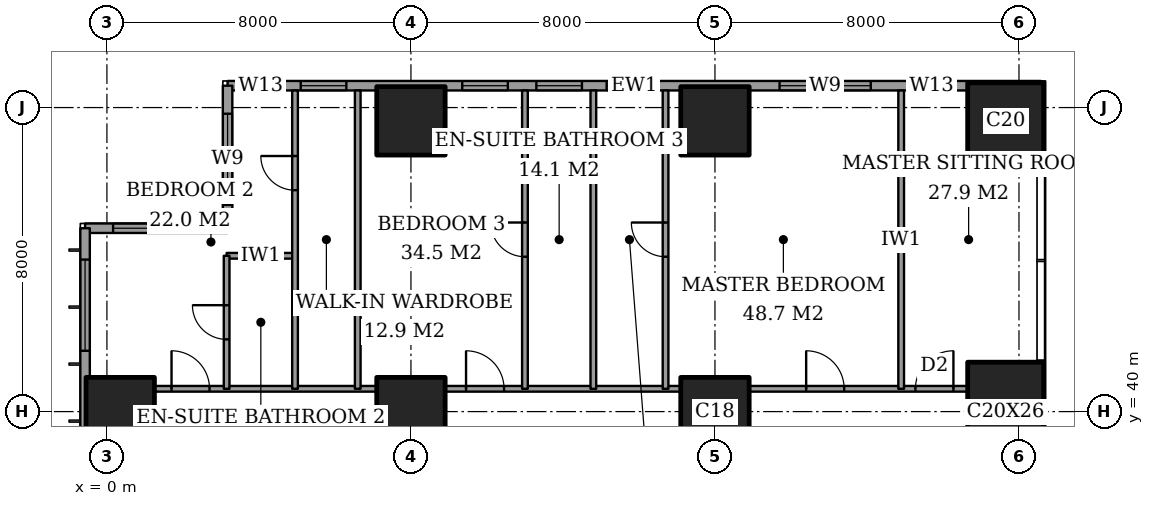
"""IFC4 building model, lengths in metres.
Left out: names, types, materials, properties, quantities, classifications, styles, units other than length and angle.
Written with IfcOpenShell. Run it as: python <this file> out.ifc"""

import sys

from ifc_helpers import new_model, si_unit, direction, frame, frame_2d, origin, origin_2d, place, context, subcontext, project, spatial, rectangle, extrude, element, fill, save


model = new_model("IFC4")
c1 = context("Model", 3, precision=1e-05, world=origin(), true_north=direction((0.0, 1.0)))
c2 = subcontext(c1, "Body", "Model", "MODEL_VIEW")
j1 = project(units=[si_unit("LENGTHUNIT", "METRE"), si_unit("PLANEANGLEUNIT", "RADIAN")], contexts=[c1])
p1 = place(None, origin())
s1 = spatial("IfcSite", under=j1, at=p1, CompositionType="ELEMENT")
p2 = place(p1, origin())
s2 = spatial("IfcBuilding", under=s1, at=p2, CompositionType="ELEMENT")
p3 = place(p2, frame((0.0, 0.0, 214.6)))
s3 = spatial("IfcBuildingStorey", under=s2, at=p3, CompositionType="ELEMENT", Elevation=214.6)
for number, where, z_axis, x_axis in (
    (1, (0.35, 40.0, 0.0), (0.0, 0.0, 1.0), (1.0, 0.0, 0.0)),
    (2, (8.0, 40.0, 0.0), (0.0, 0.0, 1.0), (1.0, 0.0, 0.0)),
    (3, (8.0, 47.65, 0.0), (0.0, 0.0, 1.0), (1.0, 0.0, 0.0)),
    (4, (16.0, 40.0, 0.0), (0.0, 0.0, 1.0), (1.0, 0.0, 0.0)),
    (5, (16.0, 47.65, 0.0), (0.0, 0.0, 1.0), (1.0, 0.0, 0.0)),
):
    element("IfcColumn", number, at=place(p3, frame(where, z_axis=z_axis, x_axis=x_axis)), inside=s3, PredefinedType="COLUMN", context=c2, shape_type="SweptSolid", body=[
        extrude(rectangle(XDim=1.8, YDim=1.8, at=origin_2d()), origin(), (0.0, 0.0, 1.0), 3.6),
    ])
p4 = place(p3, frame((23.65, 40.0, 0.0), z_axis=(0.0, 0.0, 1.0), x_axis=(1.0, 0.0, 0.0)))
e6 = element("IfcColumn", 6, at=p4, inside=s3, PredefinedType="COLUMN", context=c2, shape_type="SweptSolid", body=[
    extrude(rectangle(XDim=2.0, YDim=2.6, at=origin_2d()), origin(), (0.0, 0.0, 1.0), 3.6),
])
p5 = place(p3, frame((23.65, 47.65, 0.0), z_axis=(0.0, 0.0, 1.0), x_axis=(1.0, 0.0, 0.0)))
e7 = element("IfcColumn", 7, at=p5, inside=s3, PredefinedType="COLUMN", context=c2, shape_type="SweptSolid", body=[
    extrude(rectangle(XDim=2.0, YDim=2.0, at=origin_2d()), origin(), (0.0, 0.0, 1.0), 3.6),
])
p6 = place(p3, frame((24.575, 48.575, 0.0), z_axis=(0.0, 0.0, 1.0), x_axis=(-1.0, 0.0, 0.0)))
e8 = element("IfcWall", 8, at=p6, inside=s3, PredefinedType="SOLIDWALL", context=c2, shape_type="SweptSolid", body=[
    extrude(rectangle(XDim=21.4, YDim=0.25, at=frame_2d((10.7, 0.0))), origin(), (0.0, 0.0, 1.0), 3.6),
])
p7 = place(p6, frame((2.275, 0.0, 0.2)))
e9 = element("IfcOpeningElement", 9, at=p7, cuts=e8, PredefinedType="OPENING", context=c2, shape_type="SweptSolid", body=[
    extrude(rectangle(XDim=1.2, YDim=2.4, at=frame_2d((0.6, 1.2))), frame((0.0, 0.135, 0.0), z_axis=(0.0, -1.0, 0.0), x_axis=(1.0, 0.0, 0.0)), (0.0, 0.0, 1.0), 0.27),
])
p8 = place(p6, frame((4.475, 0.0, 0.2)))
e10 = element("IfcOpeningElement", 10, at=p8, cuts=e8, PredefinedType="OPENING", context=c2, shape_type="SweptSolid", body=[
    extrude(rectangle(XDim=2.4, YDim=2.4, at=frame_2d((1.2, 1.2))), frame((0.0, 0.135, 0.0), z_axis=(0.0, -1.0, 0.0), x_axis=(1.0, 0.0, 0.0)), (0.0, 0.0, 1.0), 0.27),
])
p9 = place(p6, frame((10.225, 0.0, 0.2)))
e11 = element("IfcOpeningElement", 11, at=p9, cuts=e8, PredefinedType="OPENING", context=c2, shape_type="SweptSolid", body=[
    extrude(rectangle(XDim=1.2, YDim=2.4, at=frame_2d((0.6, 1.2))), frame((0.0, 0.135, 0.0), z_axis=(0.0, -1.0, 0.0), x_axis=(1.0, 0.0, 0.0)), (0.0, 0.0, 1.0), 0.27),
])
p10 = place(p6, frame((12.075, 0.0, 0.2)))
e12 = element("IfcOpeningElement", 12, at=p10, cuts=e8, PredefinedType="OPENING", context=c2, shape_type="SweptSolid", body=[
    extrude(rectangle(XDim=1.2, YDim=2.4, at=frame_2d((0.6, 1.2))), frame((0.0, 0.135, 0.0), z_axis=(0.0, -1.0, 0.0), x_axis=(1.0, 0.0, 0.0)), (0.0, 0.0, 1.0), 0.27),
])
p11 = place(p6, frame((14.025, 0.0, 0.2)))
e13 = element("IfcOpeningElement", 13, at=p11, cuts=e8, PredefinedType="OPENING", context=c2, shape_type="SweptSolid", body=[
    extrude(rectangle(XDim=1.2, YDim=2.4, at=frame_2d((0.6, 1.2))), frame((0.0, 0.135, 0.0), z_axis=(0.0, -1.0, 0.0), x_axis=(1.0, 0.0, 0.0)), (0.0, 0.0, 1.0), 0.27),
])
p12 = place(p6, frame((18.275, 0.0, 0.2)))
e14 = element("IfcOpeningElement", 14, at=p12, cuts=e8, PredefinedType="OPENING", context=c2, shape_type="SweptSolid", body=[
    extrude(rectangle(XDim=1.2, YDim=2.4, at=frame_2d((0.6, 1.2))), frame((0.0, 0.135, 0.0), z_axis=(0.0, -1.0, 0.0), x_axis=(1.0, 0.0, 0.0)), (0.0, 0.0, 1.0), 0.27),
])
p13 = place(p6, frame((19.925, 0.0, 0.2)))
e15 = element("IfcOpeningElement", 15, at=p13, cuts=e8, PredefinedType="OPENING", context=c2, shape_type="SweptSolid", body=[
    extrude(rectangle(XDim=1.2, YDim=2.4, at=frame_2d((0.6, 1.2))), frame((0.0, 0.135, 0.0), z_axis=(0.0, -1.0, 0.0), x_axis=(1.0, 0.0, 0.0)), (0.0, 0.0, 1.0), 0.27),
])
p14 = place(p3, frame((3.175, 48.575, 0.0), z_axis=(0.0, 0.0, 1.0), x_axis=(0.0, -1.0, 0.0)))
e16 = element("IfcWall", 16, at=p14, inside=s3, PredefinedType="SOLIDWALL", context=c2, shape_type="SweptSolid", body=[
    extrude(rectangle(XDim=3.75, YDim=0.25, at=frame_2d((1.875, 0.0))), origin(), (0.0, 0.0, 1.0), 3.6),
])
p15 = place(p14, frame((0.738, 0.0, 0.2)))
e17 = element("IfcOpeningElement", 17, at=p15, cuts=e16, PredefinedType="OPENING", context=c2, shape_type="SweptSolid", body=[
    extrude(rectangle(XDim=2.4, YDim=2.4, at=frame_2d((1.2, 1.2))), frame((0.0, 0.135, 0.0), z_axis=(0.0, -1.0, 0.0), x_axis=(1.0, 0.0, 0.0)), (0.0, 0.0, 1.0), 0.27),
])
p16 = place(p3, frame((3.175, 44.825, 0.0), z_axis=(0.0, 0.0, 1.0), x_axis=(-1.0, 0.0, 0.0)))
e18 = element("IfcWall", 18, at=p16, inside=s3, PredefinedType="SOLIDWALL", context=c2, shape_type="SweptSolid", body=[
    extrude(rectangle(XDim=3.75, YDim=0.25, at=frame_2d((1.875, 0.0))), origin(), (0.0, 0.0, 1.0), 3.6),
])
p17 = place(p16, frame((0.613, 0.0, 0.2)))
e19 = element("IfcOpeningElement", 19, at=p17, cuts=e18, PredefinedType="OPENING", context=c2, shape_type="SweptSolid", body=[
    extrude(rectangle(XDim=2.4, YDim=2.4, at=frame_2d((1.2, 1.2))), frame((0.0, 0.135, 0.0), z_axis=(0.0, -1.0, 0.0), x_axis=(1.0, 0.0, 0.0)), (0.0, 0.0, 1.0), 0.27),
])
p18 = place(p3, frame((-0.575, 44.825, 0.0), z_axis=(0.0, 0.0, 1.0), x_axis=(0.0, -1.0, 0.0)))
e20 = element("IfcWall", 20, at=p18, inside=s3, PredefinedType="SOLIDWALL", context=c2, shape_type="SweptSolid", body=[
    extrude(rectangle(XDim=41.65, YDim=0.25, at=frame_2d((20.825, 0.0))), origin(), (0.0, 0.0, 1.0), 3.6),
])
p19 = place(p18, frame((0.825, 0.0, 0.2)))
e21 = element("IfcOpeningElement", 21, at=p19, cuts=e20, PredefinedType="OPENING", context=c2, shape_type="SweptSolid", body=[
    extrude(rectangle(XDim=2.4, YDim=2.4, at=frame_2d((1.2, 1.2))), frame((0.0, 0.135, 0.0), z_axis=(0.0, -1.0, 0.0), x_axis=(1.0, 0.0, 0.0)), (0.0, 0.0, 1.0), 0.27),
])
p20 = place(p18, frame((6.05, 0.0, 0.2)))
e22 = element("IfcOpeningElement", 22, at=p20, cuts=e20, PredefinedType="OPENING", context=c2, shape_type="SweptSolid", body=[
    extrude(rectangle(XDim=1.2, YDim=2.4, at=frame_2d((0.6, 1.2))), frame((0.0, 0.135, 0.0), z_axis=(0.0, -1.0, 0.0), x_axis=(1.0, 0.0, 0.0)), (0.0, 0.0, 1.0), 0.27),
])
p21 = place(p18, frame((8.225, 0.0, 0.2)))
e23 = element("IfcOpeningElement", 23, at=p21, cuts=e20, PredefinedType="OPENING", context=c2, shape_type="SweptSolid", body=[
    extrude(rectangle(XDim=2.4, YDim=2.4, at=frame_2d((1.2, 1.2))), frame((0.0, 0.135, 0.0), z_axis=(0.0, -1.0, 0.0), x_axis=(1.0, 0.0, 0.0)), (0.0, 0.0, 1.0), 0.27),
])
p22 = place(p18, frame((15.625, 0.0, 0.2)))
e24 = element("IfcOpeningElement", 24, at=p22, cuts=e20, PredefinedType="OPENING", context=c2, shape_type="SweptSolid", body=[
    extrude(rectangle(XDim=2.4, YDim=2.4, at=frame_2d((1.2, 1.2))), frame((0.0, 0.135, 0.0), z_axis=(0.0, -1.0, 0.0), x_axis=(1.0, 0.0, 0.0)), (0.0, 0.0, 1.0), 0.27),
])
p23 = place(p18, frame((23.625, 0.0, 0.2)))
e25 = element("IfcOpeningElement", 25, at=p23, cuts=e20, PredefinedType="OPENING", context=c2, shape_type="SweptSolid", body=[
    extrude(rectangle(XDim=2.4, YDim=2.4, at=frame_2d((1.2, 1.2))), frame((0.0, 0.135, 0.0), z_axis=(0.0, -1.0, 0.0), x_axis=(1.0, 0.0, 0.0)), (0.0, 0.0, 1.0), 0.27),
])
p24 = place(p18, frame((30.775, 0.0, 0.2)))
e26 = element("IfcOpeningElement", 26, at=p24, cuts=e20, PredefinedType="OPENING", context=c2, shape_type="SweptSolid", body=[
    extrude(rectangle(XDim=2.4, YDim=2.4, at=frame_2d((1.2, 1.2))), frame((0.0, 0.135, 0.0), z_axis=(0.0, -1.0, 0.0), x_axis=(1.0, 0.0, 0.0)), (0.0, 0.0, 1.0), 0.27),
])
p25 = place(p18, frame((34.55, 0.0, 0.2)))
e27 = element("IfcOpeningElement", 27, at=p25, cuts=e20, PredefinedType="OPENING", context=c2, shape_type="SweptSolid", body=[
    extrude(rectangle(XDim=1.2, YDim=2.4, at=frame_2d((0.6, 1.2))), frame((0.0, 0.135, 0.0), z_axis=(0.0, -1.0, 0.0), x_axis=(1.0, 0.0, 0.0)), (0.0, 0.0, 1.0), 0.27),
])
p26 = place(p18, frame((38.425, 0.0, 0.2)))
e28 = element("IfcOpeningElement", 28, at=p26, cuts=e20, PredefinedType="OPENING", context=c2, shape_type="SweptSolid", body=[
    extrude(rectangle(XDim=2.4, YDim=2.4, at=frame_2d((1.2, 1.2))), frame((0.0, 0.135, 0.0), z_axis=(0.0, -1.0, 0.0), x_axis=(1.0, 0.0, 0.0)), (0.0, 0.0, 1.0), 0.27),
])
p27 = place(p3, frame((1.25, 40.6, 0.0), z_axis=(0.0, 0.0, 1.0), x_axis=(1.0, 0.0, 0.0)))
e29 = element("IfcWall", 29, at=p27, inside=s3, PredefinedType="PARTITIONING", context=c2, shape_type="SweptSolid", body=[
    extrude(rectangle(XDim=5.85, YDim=0.15, at=frame_2d((2.925, 0.0))), origin(), (0.0, 0.0, 1.0), 3.35),
])
p28 = place(p27, frame((0.45, 0.0, 0.0)))
e30 = element("IfcOpeningElement", 30, at=p28, cuts=e29, PredefinedType="OPENING", context=c2, shape_type="SweptSolid", body=[
    extrude(rectangle(XDim=1.0, YDim=2.1, at=frame_2d((0.5, 1.05))), frame((0.0, 0.085, 0.0), z_axis=(0.0, -1.0, 0.0), x_axis=(1.0, 0.0, 0.0)), (0.0, 0.0, 1.0), 0.17),
])
p29 = place(p3, frame((8.9, 40.6, 0.0), z_axis=(0.0, 0.0, 1.0), x_axis=(1.0, 0.0, 0.0)))
e31 = element("IfcWall", 31, at=p29, inside=s3, PredefinedType="PARTITIONING", context=c2, shape_type="SweptSolid", body=[
    extrude(rectangle(XDim=6.2, YDim=0.15, at=frame_2d((3.1, 0.0))), origin(), (0.0, 0.0, 1.0), 3.35),
])
p30 = place(p29, frame((0.55, 0.0, 0.0)))
e32 = element("IfcOpeningElement", 32, at=p30, cuts=e31, PredefinedType="OPENING", context=c2, shape_type="SweptSolid", body=[
    extrude(rectangle(XDim=1.0, YDim=2.1, at=frame_2d((0.5, 1.05))), frame((0.0, 0.085, 0.0), z_axis=(0.0, -1.0, 0.0), x_axis=(1.0, 0.0, 0.0)), (0.0, 0.0, 1.0), 0.17),
])
p31 = place(p3, frame((16.9, 40.6, 0.0), z_axis=(0.0, 0.0, 1.0), x_axis=(1.0, 0.0, 0.0)))
e33 = element("IfcWall", 33, at=p31, inside=s3, PredefinedType="PARTITIONING", context=c2, shape_type="SweptSolid", body=[
    extrude(rectangle(XDim=5.75, YDim=0.15, at=frame_2d((2.875, 0.0))), origin(), (0.0, 0.0, 1.0), 3.35),
])
p32 = place(p31, frame((1.5, 0.0, 0.0)))
e34 = element("IfcOpeningElement", 34, at=p32, cuts=e33, PredefinedType="OPENING", context=c2, shape_type="SweptSolid", body=[
    extrude(rectangle(XDim=1.0, YDim=2.1, at=frame_2d((0.5, 1.05))), frame((0.0, 0.085, 0.0), z_axis=(0.0, -1.0, 0.0), x_axis=(1.0, 0.0, 0.0)), (0.0, 0.0, 1.0), 0.17),
])
p33 = place(p31, frame((4.375, 0.0, 0.0)))
e35 = element("IfcOpeningElement", 35, at=p33, cuts=e33, PredefinedType="OPENING", context=c2, shape_type="SweptSolid", body=[
    extrude(rectangle(XDim=1.0, YDim=2.1, at=frame_2d((0.5, 1.05))), frame((0.0, 0.085, 0.0), z_axis=(0.0, -1.0, 0.0), x_axis=(1.0, 0.0, 0.0)), (0.0, 0.0, 1.0), 0.17),
])
p34 = place(p3, frame((3.15, 44.1, 0.0), z_axis=(0.0, 0.0, 1.0), x_axis=(1.0, 0.0, 0.0)))
e36 = element("IfcWall", 36, at=p34, inside=s3, PredefinedType="PARTITIONING", context=c2, shape_type="SweptSolid", body=[
    extrude(rectangle(XDim=1.8, YDim=0.15, at=frame_2d((0.9, 0.0))), origin(), (0.0, 0.0, 1.0), 3.35),
])
p35 = place(p3, frame((3.15, 40.6, 0.0), z_axis=(0.0, 0.0, 1.0), x_axis=(0.0, 1.0, 0.0)))
e37 = element("IfcWall", 37, at=p35, inside=s3, PredefinedType="PARTITIONING", context=c2, shape_type="SweptSolid", body=[
    extrude(rectangle(XDim=3.5, YDim=0.15, at=frame_2d((1.75, 0.0))), origin(), (0.0, 0.0, 1.0), 3.35),
])
p36 = place(p35, frame((1.3, 0.0, 0.0)))
e38 = element("IfcOpeningElement", 38, at=p36, cuts=e37, PredefinedType="OPENING", context=c2, shape_type="SweptSolid", body=[
    extrude(rectangle(XDim=0.9, YDim=2.1, at=frame_2d((0.45, 1.05))), frame((0.0, 0.085, 0.0), z_axis=(0.0, -1.0, 0.0), x_axis=(1.0, 0.0, 0.0)), (0.0, 0.0, 1.0), 0.17),
])
p37 = place(p3, frame((4.95, 40.6, 0.0), z_axis=(0.0, 0.0, 1.0), x_axis=(0.0, 1.0, 0.0)))
e39 = element("IfcWall", 39, at=p37, inside=s3, PredefinedType="PARTITIONING", context=c2, shape_type="SweptSolid", body=[
    extrude(rectangle(XDim=7.85, YDim=0.15, at=frame_2d((3.925, 0.0))), origin(), (0.0, 0.0, 1.0), 3.35),
])
p38 = place(p37, frame((5.225, 0.0, 0.0)))
e40 = element("IfcOpeningElement", 40, at=p38, cuts=e39, PredefinedType="OPENING", context=c2, shape_type="SweptSolid", body=[
    extrude(rectangle(XDim=0.9, YDim=2.1, at=frame_2d((0.45, 1.05))), frame((0.0, 0.085, 0.0), z_axis=(0.0, -1.0, 0.0), x_axis=(1.0, 0.0, 0.0)), (0.0, 0.0, 1.0), 0.17),
])
p39 = place(p3, frame((6.6, 40.6, 0.0), z_axis=(0.0, 0.0, 1.0), x_axis=(0.0, 1.0, 0.0)))
e41 = element("IfcWall", 41, at=p39, inside=s3, PredefinedType="PARTITIONING", context=c2, shape_type="SweptSolid", body=[
    extrude(rectangle(XDim=7.85, YDim=0.15, at=frame_2d((3.925, 0.0))), origin(), (0.0, 0.0, 1.0), 3.35),
])
p40 = place(p3, frame((11.0, 40.6, 0.0), z_axis=(0.0, 0.0, 1.0), x_axis=(0.0, 1.0, 0.0)))
e42 = element("IfcWall", 42, at=p40, inside=s3, PredefinedType="PARTITIONING", context=c2, shape_type="SweptSolid", body=[
    extrude(rectangle(XDim=7.85, YDim=0.15, at=frame_2d((3.925, 0.0))), origin(), (0.0, 0.0, 1.0), 3.35),
])
p41 = place(p40, frame((3.475, 0.0, 0.0)))
e43 = element("IfcOpeningElement", 43, at=p41, cuts=e42, PredefinedType="OPENING", context=c2, shape_type="SweptSolid", body=[
    extrude(rectangle(XDim=0.9, YDim=2.1, at=frame_2d((0.45, 1.05))), frame((0.0, 0.085, 0.0), z_axis=(0.0, -1.0, 0.0), x_axis=(1.0, 0.0, 0.0)), (0.0, 0.0, 1.0), 0.17),
])
p42 = place(p3, frame((12.8, 40.6, 0.0), z_axis=(0.0, 0.0, 1.0), x_axis=(0.0, 1.0, 0.0)))
e44 = element("IfcWall", 44, at=p42, inside=s3, PredefinedType="PARTITIONING", context=c2, shape_type="SweptSolid", body=[
    extrude(rectangle(XDim=7.85, YDim=0.15, at=frame_2d((3.925, 0.0))), origin(), (0.0, 0.0, 1.0), 3.35),
])
p43 = place(p3, frame((14.7, 40.6, 0.0), z_axis=(0.0, 0.0, 1.0), x_axis=(0.0, 1.0, 0.0)))
e45 = element("IfcWall", 45, at=p43, inside=s3, PredefinedType="PARTITIONING", context=c2, shape_type="SweptSolid", body=[
    extrude(rectangle(XDim=7.85, YDim=0.15, at=frame_2d((3.925, 0.0))), origin(), (0.0, 0.0, 1.0), 3.35),
])
p44 = place(p43, frame((3.475, 0.0, 0.0)))
e46 = element("IfcOpeningElement", 46, at=p44, cuts=e45, PredefinedType="OPENING", context=c2, shape_type="SweptSolid", body=[
    extrude(rectangle(XDim=0.9, YDim=2.1, at=frame_2d((0.45, 1.05))), frame((0.0, 0.085, 0.0), z_axis=(0.0, -1.0, 0.0), x_axis=(1.0, 0.0, 0.0)), (0.0, 0.0, 1.0), 0.17),
])
p45 = place(p3, frame((20.9, 40.6, 0.0), z_axis=(0.0, 0.0, 1.0), x_axis=(0.0, 1.0, 0.0)))
e47 = element("IfcWall", 47, at=p45, inside=s3, PredefinedType="PARTITIONING", context=c2, shape_type="SweptSolid", body=[
    extrude(rectangle(XDim=7.85, YDim=0.15, at=frame_2d((3.925, 0.0))), origin(), (0.0, 0.0, 1.0), 3.35),
])
p46 = place(p7, origin())
e48 = element("IfcWindow", 48, at=p46, inside=s3, PartitioningType="SINGLE_PANEL", PredefinedType="WINDOW", context=c2, shape_type="SweptSolid", body=[
    extrude(rectangle(XDim=1.2, YDim=2.4, at=frame_2d((0.6, 1.2))), frame((0.0, 0.03, 0.0), z_axis=(0.0, -1.0, 0.0), x_axis=(1.0, 0.0, 0.0)), (0.0, 0.0, 1.0), 0.06),
])
fill(e9, e48)
p47 = place(p8, origin())
e49 = element("IfcWindow", 49, at=p47, inside=s3, PartitioningType="SINGLE_PANEL", PredefinedType="WINDOW", context=c2, shape_type="SweptSolid", body=[
    extrude(rectangle(XDim=2.4, YDim=2.4, at=frame_2d((1.2, 1.2))), frame((0.0, 0.03, 0.0), z_axis=(0.0, -1.0, 0.0), x_axis=(1.0, 0.0, 0.0)), (0.0, 0.0, 1.0), 0.06),
])
fill(e10, e49)
p48 = place(p9, origin())
e50 = element("IfcWindow", 50, at=p48, inside=s3, PartitioningType="SINGLE_PANEL", PredefinedType="WINDOW", context=c2, shape_type="SweptSolid", body=[
    extrude(rectangle(XDim=1.2, YDim=2.4, at=frame_2d((0.6, 1.2))), frame((0.0, 0.03, 0.0), z_axis=(0.0, -1.0, 0.0), x_axis=(1.0, 0.0, 0.0)), (0.0, 0.0, 1.0), 0.06),
])
fill(e11, e50)
p49 = place(p10, origin())
e51 = element("IfcWindow", 51, at=p49, inside=s3, PartitioningType="SINGLE_PANEL", PredefinedType="WINDOW", context=c2, shape_type="SweptSolid", body=[
    extrude(rectangle(XDim=1.2, YDim=2.4, at=frame_2d((0.6, 1.2))), frame((0.0, 0.03, 0.0), z_axis=(0.0, -1.0, 0.0), x_axis=(1.0, 0.0, 0.0)), (0.0, 0.0, 1.0), 0.06),
])
fill(e12, e51)
p50 = place(p11, origin())
e52 = element("IfcWindow", 52, at=p50, inside=s3, PartitioningType="SINGLE_PANEL", PredefinedType="WINDOW", context=c2, shape_type="SweptSolid", body=[
    extrude(rectangle(XDim=1.2, YDim=2.4, at=frame_2d((0.6, 1.2))), frame((0.0, 0.03, 0.0), z_axis=(0.0, -1.0, 0.0), x_axis=(1.0, 0.0, 0.0)), (0.0, 0.0, 1.0), 0.06),
])
fill(e13, e52)
p51 = place(p12, origin())
e53 = element("IfcWindow", 53, at=p51, inside=s3, PartitioningType="SINGLE_PANEL", PredefinedType="WINDOW", context=c2, shape_type="SweptSolid", body=[
    extrude(rectangle(XDim=1.2, YDim=2.4, at=frame_2d((0.6, 1.2))), frame((0.0, 0.03, 0.0), z_axis=(0.0, -1.0, 0.0), x_axis=(1.0, 0.0, 0.0)), (0.0, 0.0, 1.0), 0.06),
])
fill(e14, e53)
p52 = place(p13, origin())
e54 = element("IfcWindow", 54, at=p52, inside=s3, PartitioningType="SINGLE_PANEL", PredefinedType="WINDOW", context=c2, shape_type="SweptSolid", body=[
    extrude(rectangle(XDim=1.2, YDim=2.4, at=frame_2d((0.6, 1.2))), frame((0.0, 0.03, 0.0), z_axis=(0.0, -1.0, 0.0), x_axis=(1.0, 0.0, 0.0)), (0.0, 0.0, 1.0), 0.06),
])
fill(e15, e54)
p53 = place(p15, origin())
e55 = element("IfcWindow", 55, at=p53, inside=s3, PartitioningType="SINGLE_PANEL", PredefinedType="WINDOW", context=c2, shape_type="SweptSolid", body=[
    extrude(rectangle(XDim=2.4, YDim=2.4, at=frame_2d((1.2, 1.2))), frame((0.0, 0.03, 0.0), z_axis=(0.0, -1.0, 0.0), x_axis=(1.0, 0.0, 0.0)), (0.0, 0.0, 1.0), 0.06),
])
fill(e17, e55)
p54 = place(p17, origin())
e56 = element("IfcWindow", 56, at=p54, inside=s3, PartitioningType="SINGLE_PANEL", PredefinedType="WINDOW", context=c2, shape_type="SweptSolid", body=[
    extrude(rectangle(XDim=2.4, YDim=2.4, at=frame_2d((1.2, 1.2))), frame((0.0, 0.03, 0.0), z_axis=(0.0, -1.0, 0.0), x_axis=(1.0, 0.0, 0.0)), (0.0, 0.0, 1.0), 0.06),
])
fill(e19, e56)
p55 = place(p19, origin())
e57 = element("IfcWindow", 57, at=p55, inside=s3, PartitioningType="SINGLE_PANEL", PredefinedType="WINDOW", context=c2, shape_type="SweptSolid", body=[
    extrude(rectangle(XDim=2.4, YDim=2.4, at=frame_2d((1.2, 1.2))), frame((0.0, 0.03, 0.0), z_axis=(0.0, -1.0, 0.0), x_axis=(1.0, 0.0, 0.0)), (0.0, 0.0, 1.0), 0.06),
])
fill(e21, e57)
p56 = place(p36, origin())
e58 = element("IfcDoor", 58, at=p56, inside=s3, OperationType="SINGLE_SWING_LEFT", PredefinedType="DOOR", context=c2, shape_type="SweptSolid", body=[
    extrude(rectangle(XDim=0.9, YDim=2.1, at=frame_2d((0.45, 1.05))), frame((0.0, 0.025, 0.0), z_axis=(0.0, -1.0, 0.0), x_axis=(1.0, 0.0, 0.0)), (0.0, 0.0, 1.0), 0.05),
])
fill(e38, e58)
p57 = place(p28, origin())
e59 = element("IfcDoor", 59, at=p57, inside=s3, OperationType="SINGLE_SWING_RIGHT", PredefinedType="DOOR", context=c2, shape_type="SweptSolid", body=[
    extrude(rectangle(XDim=1.0, YDim=2.1, at=frame_2d((0.5, 1.05))), frame((0.0, 0.025, 0.0), z_axis=(0.0, -1.0, 0.0), x_axis=(1.0, 0.0, 0.0)), (0.0, 0.0, 1.0), 0.05),
])
fill(e30, e59)
p58 = place(p38, origin())
e60 = element("IfcDoor", 60, at=p58, inside=s3, OperationType="SINGLE_SWING_LEFT", PredefinedType="DOOR", context=c2, shape_type="SweptSolid", body=[
    extrude(rectangle(XDim=0.9, YDim=2.1, at=frame_2d((0.45, 1.05))), frame((0.0, 0.025, 0.0), z_axis=(0.0, -1.0, 0.0), x_axis=(1.0, 0.0, 0.0)), (0.0, 0.0, 1.0), 0.05),
])
fill(e40, e60)
p59 = place(p30, origin())
e61 = element("IfcDoor", 61, at=p59, inside=s3, OperationType="SINGLE_SWING_RIGHT", PredefinedType="DOOR", context=c2, shape_type="SweptSolid", body=[
    extrude(rectangle(XDim=1.0, YDim=2.1, at=frame_2d((0.5, 1.05))), frame((0.0, 0.025, 0.0), z_axis=(0.0, -1.0, 0.0), x_axis=(1.0, 0.0, 0.0)), (0.0, 0.0, 1.0), 0.05),
])
fill(e32, e61)
p60 = place(p41, origin())
e62 = element("IfcDoor", 62, at=p60, inside=s3, OperationType="SINGLE_SWING_LEFT", PredefinedType="DOOR", context=c2, shape_type="SweptSolid", body=[
    extrude(rectangle(XDim=0.9, YDim=2.1, at=frame_2d((0.45, 1.05))), frame((0.0, 0.025, 0.0), z_axis=(0.0, -1.0, 0.0), x_axis=(1.0, 0.0, 0.0)), (0.0, 0.0, 1.0), 0.05),
])
fill(e43, e62)
p61 = place(p44, origin())
e63 = element("IfcDoor", 63, at=p61, inside=s3, OperationType="SINGLE_SWING_LEFT", PredefinedType="DOOR", context=c2, shape_type="SweptSolid", body=[
    extrude(rectangle(XDim=0.9, YDim=2.1, at=frame_2d((0.45, 1.05))), frame((0.0, 0.025, 0.0), z_axis=(0.0, -1.0, 0.0), x_axis=(1.0, 0.0, 0.0)), (0.0, 0.0, 1.0), 0.05),
])
fill(e46, e63)
p62 = place(p32, origin())
e64 = element("IfcDoor", 64, at=p62, inside=s3, OperationType="SINGLE_SWING_RIGHT", PredefinedType="DOOR", context=c2, shape_type="SweptSolid", body=[
    extrude(rectangle(XDim=1.0, YDim=2.1, at=frame_2d((0.5, 1.05))), frame((0.0, 0.025, 0.0), z_axis=(0.0, -1.0, 0.0), x_axis=(1.0, 0.0, 0.0)), (0.0, 0.0, 1.0), 0.05),
])
fill(e34, e64)
p63 = place(p33, origin())
e65 = element("IfcDoor", 65, at=p63, inside=s3, OperationType="SINGLE_SWING_LEFT", PredefinedType="DOOR", context=c2, shape_type="SweptSolid", body=[
    extrude(rectangle(XDim=1.0, YDim=2.1, at=frame_2d((0.5, 1.05))), frame((0.0, 0.025, 0.0), z_axis=(0.0, -1.0, 0.0), x_axis=(1.0, 0.0, 0.0)), (0.0, 0.0, 1.0), 0.05),
])
fill(e35, e65)
save(model, sys.argv[1])
